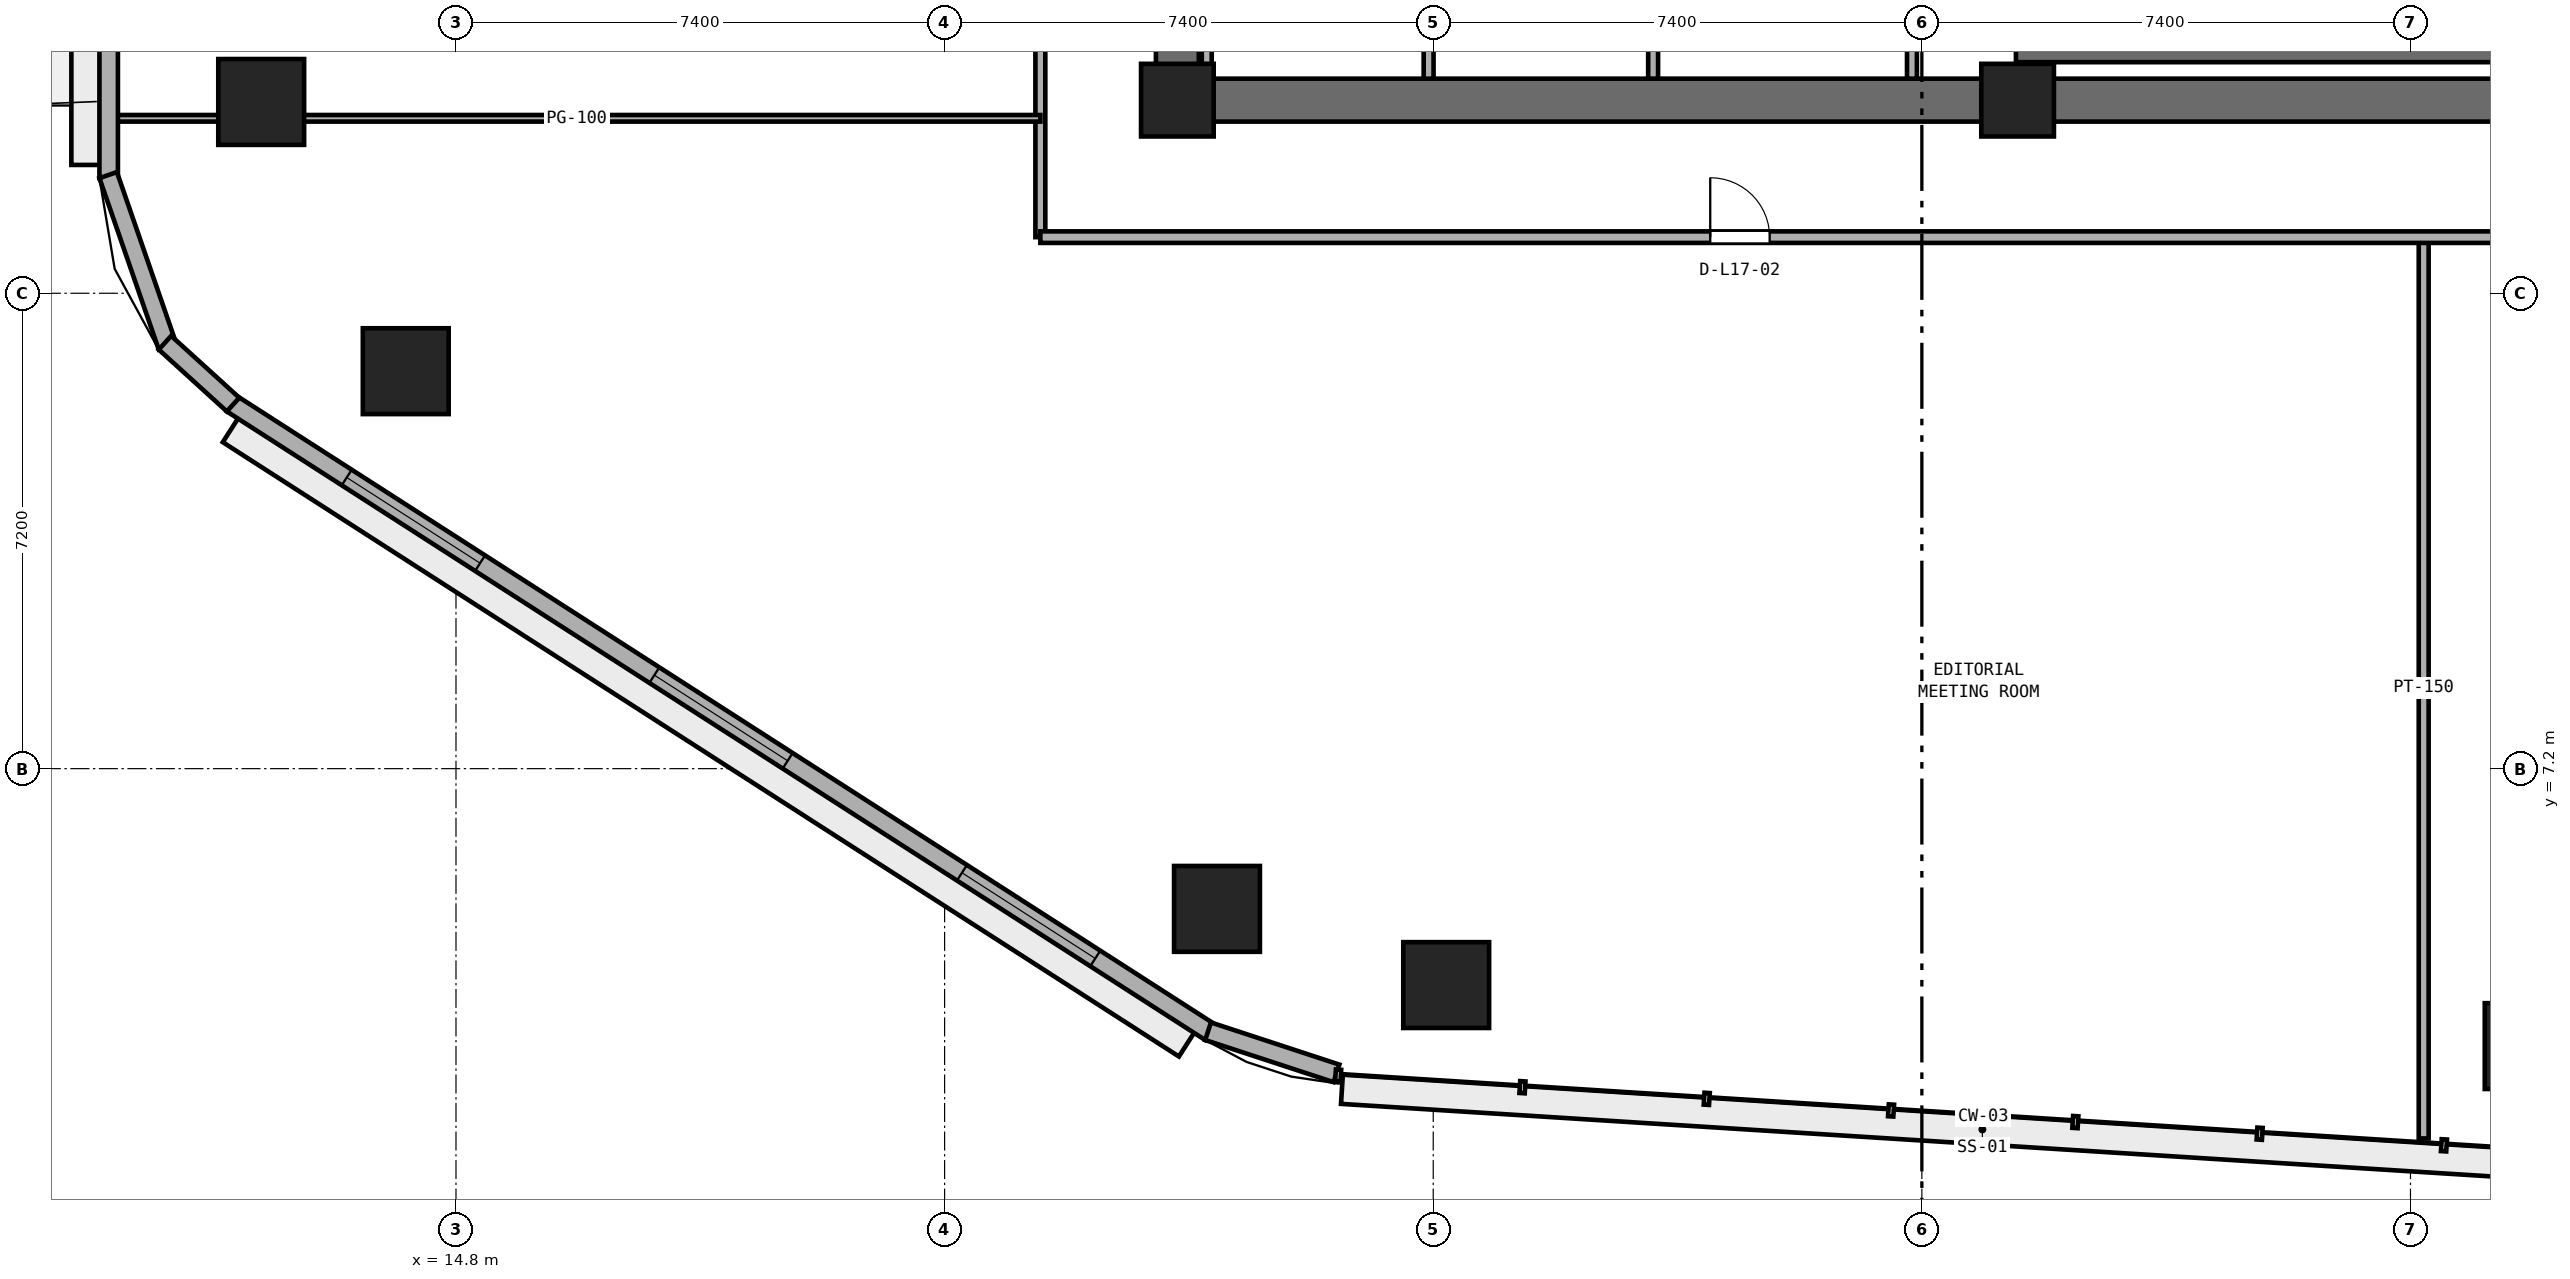
"""IFC4 building model, lengths in metres.
Left out: names, types, materials, properties, quantities, classifications, styles, units other than length and angle.
Written with IfcOpenShell. Run it as: python <this file> out.ifc"""

import sys

from ifc_helpers import new_model, si_unit, direction, frame, frame_2d, origin, origin_2d, place, context, subcontext, project, spatial, rectangle, extrude, element, fill, save


model = new_model("IFC4")
c1 = context("Model", 3, precision=1e-05, world=origin(), true_north=direction((0.0, 1.0)))
c2 = subcontext(c1, "Body", "Model", "MODEL_VIEW")
j1 = project(units=[si_unit("LENGTHUNIT", "METRE"), si_unit("PLANEANGLEUNIT", "RADIAN")], contexts=[c1])
p1 = place(None, origin())
s1 = spatial("IfcSite", under=j1, at=p1, CompositionType="ELEMENT")
p2 = place(p1, origin())
s2 = spatial("IfcBuilding", under=s1, at=p2, CompositionType="ELEMENT")
p3 = place(p2, frame((0.0, 0.0, 70.6)))
s3 = spatial("IfcBuildingStorey", under=s2, at=p3, CompositionType="ELEMENT", Elevation=70.6)
p4 = place(p3, frame((25.4, 17.325, 0.0), z_axis=(0.0, 0.0, 1.0), x_axis=(1.0, 0.0, 0.0)))
e1 = element("IfcWall", 1, at=p4, inside=s3, PredefinedType="SHEAR", context=c2, shape_type="SweptSolid", body=[
    extrude(rectangle(XDim=23.2, YDim=0.65, at=frame_2d((11.6, 0.0))), origin(), (0.0, 0.0, 1.0), 3.525),
])
p5 = place(p3, frame((25.725, 17.65, 0.0), z_axis=(0.0, 0.0, 1.0), x_axis=(0.0, 1.0, 0.0)))
e2 = element("IfcWall", 2, at=p5, inside=s3, PredefinedType="SHEAR", context=c2, shape_type="SweptSolid", body=[
    extrude(rectangle(XDim=15.1, YDim=0.65, at=frame_2d((7.55, 0.0))), origin(), (0.0, 0.0, 1.0), 3.525),
])
p6 = place(p5, frame((6.8, 0.0, 0.0)))
e3 = element("IfcOpeningElement", 3, at=p6, cuts=e2, PredefinedType="OPENING", context=c2, shape_type="SweptSolid", body=[
    extrude(rectangle(XDim=1.5, YDim=2.15, at=frame_2d((0.75, 1.075))), frame((0.0, 0.335, 0.0), z_axis=(0.0, -1.0, 0.0), x_axis=(1.0, 0.0, 0.0)), (0.0, 0.0, 1.0), 0.67),
])
for number, where, z_axis, x_axis in (
    (4, (25.725, 17.325, 0.0), (0.0, 0.0, 1.0), (1.0, 0.0, 0.0)),
    (5, (38.45, 17.325, 0.0), (0.0, 0.0, 1.0), (1.0, 0.0, 0.0)),
):
    element("IfcColumn", number, at=place(p3, frame(where, z_axis=z_axis, x_axis=x_axis)), inside=s3, PredefinedType="PILASTER", context=c2, shape_type="SweptSolid", body=[
        extrude(rectangle(XDim=1.1, YDim=1.1, at=origin_2d()), origin(), (0.0, 0.0, 1.0), 3.8),
    ])
for number, where, z_axis, x_axis in (
    (6, (29.796, 3.922, 0.0), (0.0, 0.0, 1.0), (1.0, 0.0, 0.0)),
    (7, (46.175, 2.998, 0.0), (0.0, 0.0, 1.0), (1.0, 0.0, 0.0)),
    (8, (11.85, 17.298, 0.0), (0.0, 0.0, 1.0), (1.0, 0.0, 0.0)),
    (9, (14.039, 13.22, 0.0), (0.0, 0.0, 1.0), (1.0, 0.0, 0.0)),
    (10, (26.325, 5.076, 0.0), (0.0, 0.0, 1.0), (1.0, 0.0, 0.0)),
):
    element("IfcColumn", number, at=place(p3, frame(where, z_axis=z_axis, x_axis=x_axis)), inside=s3, PredefinedType="COLUMN", context=c2, shape_type="SweptSolid", body=[
        extrude(rectangle(XDim=1.3, YDim=1.3, at=origin_2d()), origin(), (0.0, 0.0, 1.0), 3.8),
    ])
p7 = place(p3, frame((38.425, 18.025, 0.0), z_axis=(0.0, 0.0, 1.0), x_axis=(1.0, 0.0, 0.0)))
e11 = element("IfcWall", 11, at=p7, inside=s3, PredefinedType="SHEAR", context=c2, shape_type="SweptSolid", body=[
    extrude(rectangle(XDim=7.3, YDim=0.25, at=frame_2d((3.65, 0.0))), origin(), (0.0, 0.0, 1.0), 3.525),
])
for number, where, z_axis, x_axis in (
    (12, (26.17, 17.65, 0.0), (0.0, 0.0, 1.0), (0.0, 1.0, 0.0)),
    (13, (29.53, 17.65, 0.0), (0.0, 0.0, 1.0), (0.0, 1.0, 0.0)),
    (14, (32.93, 17.65, 0.0), (0.0, 0.0, 1.0), (0.0, 1.0, 0.0)),
    (15, (36.85, 17.65, 0.0), (0.0, 0.0, 1.0), (0.0, 1.0, 0.0)),
):
    element("IfcWall", number, at=place(p3, frame(where, z_axis=z_axis, x_axis=x_axis)), inside=s3, PredefinedType="PARTITIONING", context=c2, shape_type="SweptSolid", body=[
        extrude(rectangle(XDim=2.1, YDim=0.15, at=frame_2d((1.05, 0.0))), origin(), (0.0, 0.0, 1.0), 3.525),
    ])
p8 = place(p3, frame((44.6, 1.599, 0.0), z_axis=(0.0, 0.0, 1.0), x_axis=(0.0, 1.0, 0.0)))
e16 = element("IfcWall", 16, at=p8, inside=s3, PredefinedType="PARTITIONING", context=c2, shape_type="SweptSolid", body=[
    extrude(rectangle(XDim=13.651, YDim=0.15, at=frame_2d((6.825, 0.0))), origin(), (0.0, 0.0, 1.0), 3.525),
])
p9 = place(p3, frame((23.65, 15.25, 0.0), z_axis=(0.0, 0.0, 1.0), x_axis=(0.0, 1.0, 0.0)))
e17 = element("IfcWall", 17, at=p9, inside=s3, PredefinedType="PARTITIONING", context=c2, shape_type="SweptSolid", body=[
    extrude(rectangle(XDim=19.9, YDim=0.15, at=frame_2d((9.95, 0.0))), origin(), (0.0, 0.0, 1.0), 3.525),
])
p10 = place(p9, frame((9.5, 0.0, 0.0)))
e18 = element("IfcOpeningElement", 18, at=p10, cuts=e17, PredefinedType="OPENING", context=c2, shape_type="SweptSolid", body=[
    extrude(rectangle(XDim=0.9, YDim=2.1, at=frame_2d((0.45, 1.05))), frame((0.0, 0.085, 0.0), z_axis=(0.0, -1.0, 0.0), x_axis=(1.0, 0.0, 0.0)), (0.0, 0.0, 1.0), 0.17),
])
p11 = place(p3, frame((23.65, 15.25, 0.0), z_axis=(0.0, 0.0, 1.0), x_axis=(1.0, 0.0, 0.0)))
e19 = element("IfcWall", 19, at=p11, inside=s3, PredefinedType="PARTITIONING", context=c2, shape_type="SweptSolid", body=[
    extrude(rectangle(XDim=26.7, YDim=0.175, at=frame_2d((13.35, 0.0))), origin(), (0.0, 0.0, 1.0), 3.525),
])
p12 = place(p11, frame((10.145, 0.0, 0.0)))
e20 = element("IfcOpeningElement", 20, at=p12, cuts=e19, PredefinedType="OPENING", context=c2, shape_type="SweptSolid", body=[
    extrude(rectangle(XDim=0.9, YDim=2.1, at=frame_2d((0.45, 1.05))), frame((0.0, 0.097, 0.0), z_axis=(0.0, -1.0, 0.0), x_axis=(1.0, 0.0, 0.0)), (0.0, 0.0, 1.0), 0.195),
])
p13 = place(p11, frame((23.255, 0.0, 0.0)))
e21 = element("IfcOpeningElement", 21, at=p13, cuts=e19, PredefinedType="OPENING", context=c2, shape_type="SweptSolid", body=[
    extrude(rectangle(XDim=0.9, YDim=2.1, at=frame_2d((0.45, 1.05))), frame((0.0, 0.097, 0.0), z_axis=(0.0, -1.0, 0.0), x_axis=(1.0, 0.0, 0.0)), (0.0, 0.0, 1.0), 0.195),
])
p14 = place(p3, frame((9.605, 17.05, 0.0), z_axis=(0.0, 0.0, 1.0), x_axis=(1.0, 0.0, 0.0)))
e22 = element("IfcWall", 22, at=p14, inside=s3, PredefinedType="PARTITIONING", context=c2, shape_type="SweptSolid", body=[
    extrude(rectangle(XDim=14.045, YDim=0.1, at=frame_2d((7.022, 0.0))), origin(), (0.0, 0.0, 1.0), 3.525),
])
p15 = place(p3, frame((9.54, 33.444, 0.0), z_axis=(0.0, 0.0, 1.0), x_axis=(0.0, -1.0, 0.0)))
e23 = element("IfcWall", 23, at=p15, inside=s3, PredefinedType="STANDARD", context=c2, shape_type="SweptSolid", body=[
    extrude(rectangle(XDim=17.301, YDim=0.28, at=frame_2d((8.65, 0.0))), origin(), (0.0, 0.0, 1.0), 3.525),
])
p16 = place(p15, frame((8.1, 0.0, 0.0)))
e24 = element("IfcOpeningElement", 24, at=p16, cuts=e23, PredefinedType="OPENING", context=c2, shape_type="SweptSolid", body=[
    extrude(rectangle(XDim=1.1, YDim=2.2, at=frame_2d((0.55, 1.1))), frame((0.0, 0.15, 0.0), z_axis=(0.0, -1.0, 0.0), x_axis=(1.0, 0.0, 0.0)), (0.0, 0.0, 1.0), 0.3),
])
p17 = place(p15, frame((2.017, 0.0, 0.9)))
e25 = element("IfcOpeningElement", 25, at=p17, cuts=e23, PredefinedType="OPENING", context=c2, shape_type="SweptSolid", body=[
    extrude(rectangle(XDim=2.4, YDim=1.75, at=frame_2d((1.2, 0.875))), frame((0.0, 0.15, 0.0), z_axis=(0.0, -1.0, 0.0), x_axis=(1.0, 0.0, 0.0)), (0.0, 0.0, 1.0), 0.3),
])
p18 = place(p15, frame((12.884, 0.0, 0.9)))
e26 = element("IfcOpeningElement", 26, at=p18, cuts=e23, PredefinedType="OPENING", context=c2, shape_type="SweptSolid", body=[
    extrude(rectangle(XDim=2.4, YDim=1.75, at=frame_2d((1.2, 0.875))), frame((0.0, 0.15, 0.0), z_axis=(0.0, -1.0, 0.0), x_axis=(1.0, 0.0, 0.0)), (0.0, 0.0, 1.0), 0.3),
])
p19 = place(p3, frame((11.405, 12.728, 0.0), z_axis=(0.0, 0.0, 1.0), x_axis=(0.841304564637, -0.540561402175, 0.0)))
e27 = element("IfcWall", 27, at=p19, inside=s3, PredefinedType="STANDARD", context=c2, shape_type="SweptSolid", body=[
    extrude(rectangle(XDim=17.612, YDim=0.28, at=frame_2d((8.806, 0.0))), origin(), (0.0, 0.0, 1.0), 3.525),
])
p20 = place(p19, frame((2.069, 0.0, 0.9)))
e28 = element("IfcOpeningElement", 28, at=p20, cuts=e27, PredefinedType="OPENING", context=c2, shape_type="SweptSolid", body=[
    extrude(rectangle(XDim=2.4, YDim=1.75, at=frame_2d((1.2, 0.875))), frame((0.0, 0.15, 0.0), z_axis=(0.0, -1.0, 0.0), x_axis=(1.0, 0.0, 0.0)), (0.0, 0.0, 1.0), 0.3),
])
p21 = place(p19, frame((7.606, 0.0, 0.9)))
e29 = element("IfcOpeningElement", 29, at=p21, cuts=e27, PredefinedType="OPENING", context=c2, shape_type="SweptSolid", body=[
    extrude(rectangle(XDim=2.4, YDim=1.75, at=frame_2d((1.2, 0.875))), frame((0.0, 0.15, 0.0), z_axis=(0.0, -1.0, 0.0), x_axis=(1.0, 0.0, 0.0)), (0.0, 0.0, 1.0), 0.3),
])
p22 = place(p19, frame((13.143, 0.0, 0.9)))
e30 = element("IfcOpeningElement", 30, at=p22, cuts=e27, PredefinedType="OPENING", context=c2, shape_type="SweptSolid", body=[
    extrude(rectangle(XDim=2.4, YDim=1.75, at=frame_2d((1.2, 0.875))), frame((0.0, 0.15, 0.0), z_axis=(0.0, -1.0, 0.0), x_axis=(1.0, 0.0, 0.0)), (0.0, 0.0, 1.0), 0.3),
])
p23 = place(p3, frame((9.532, 16.189, 0.0), z_axis=(0.0, 0.0, 1.0), x_axis=(0.32708309668, -0.944995580871, 0.0)))
e31 = element("IfcWall", 31, at=p23, inside=s3, PredefinedType="STANDARD", context=c2, shape_type="SweptSolid", body=[
    extrude(rectangle(XDim=2.748, YDim=0.28, at=frame_2d((1.374, 0.0))), origin(), (0.0, 0.0, 1.0), 3.525),
])
p24 = place(p3, frame((10.393, 13.651, 0.0), z_axis=(0.0, 0.0, 1.0), x_axis=(0.74003521851, -0.672568119498, 0.0)))
e32 = element("IfcWall", 32, at=p24, inside=s3, PredefinedType="STANDARD", context=c2, shape_type="SweptSolid", body=[
    extrude(rectangle(XDim=1.393, YDim=0.28, at=frame_2d((0.697, 0.0))), origin(), (0.0, 0.0, 1.0), 3.525),
])
p25 = place(p3, frame((26.19, 3.223, 0.0), z_axis=(0.0, 0.0, 1.0), x_axis=(0.950175683881, -0.311714885371, 0.0)))
e33 = element("IfcWall", 33, at=p25, inside=s3, PredefinedType="STANDARD", context=c2, shape_type="SweptSolid", body=[
    extrude(rectangle(XDim=2.047, YDim=0.28, at=frame_2d((1.023, 0.0))), origin(), (0.0, 0.0, 1.0), 3.525),
])
p26 = place(p12, origin())
e34 = element("IfcDoor", 34, at=p26, inside=s3, OperationType="SINGLE_SWING_LEFT", PredefinedType="DOOR", context=c2, shape_type="SweptSolid", body=[
    extrude(rectangle(XDim=0.9, YDim=2.1, at=frame_2d((0.45, 1.05))), frame((0.0, 0.025, 0.0), z_axis=(0.0, -1.0, 0.0), x_axis=(1.0, 0.0, 0.0)), (0.0, 0.0, 1.0), 0.05),
])
fill(e20, e34)
p27 = place(p20, origin())
e35 = element("IfcWindow", 35, at=p27, inside=s3, PartitioningType="SINGLE_PANEL", PredefinedType="WINDOW", context=c2, shape_type="SweptSolid", body=[
    extrude(rectangle(XDim=2.4, YDim=1.75, at=frame_2d((1.2, 0.875))), frame((0.0, 0.03, 0.0), z_axis=(0.0, -1.0, 0.0), x_axis=(1.0, 0.0, 0.0)), (0.0, 0.0, 1.0), 0.06),
])
fill(e28, e35)
p28 = place(p21, origin())
e36 = element("IfcWindow", 36, at=p28, inside=s3, PartitioningType="SINGLE_PANEL", PredefinedType="WINDOW", context=c2, shape_type="SweptSolid", body=[
    extrude(rectangle(XDim=2.4, YDim=1.75, at=frame_2d((1.2, 0.875))), frame((0.0, 0.03, 0.0), z_axis=(0.0, -1.0, 0.0), x_axis=(1.0, 0.0, 0.0)), (0.0, 0.0, 1.0), 0.06),
])
fill(e29, e36)
p29 = place(p22, origin())
e37 = element("IfcWindow", 37, at=p29, inside=s3, PartitioningType="SINGLE_PANEL", PredefinedType="WINDOW", context=c2, shape_type="SweptSolid", body=[
    extrude(rectangle(XDim=2.4, YDim=1.75, at=frame_2d((1.2, 0.875))), frame((0.0, 0.03, 0.0), z_axis=(0.0, -1.0, 0.0), x_axis=(1.0, 0.0, 0.0)), (0.0, 0.0, 1.0), 0.06),
])
fill(e30, e37)
save(model, sys.argv[1])
